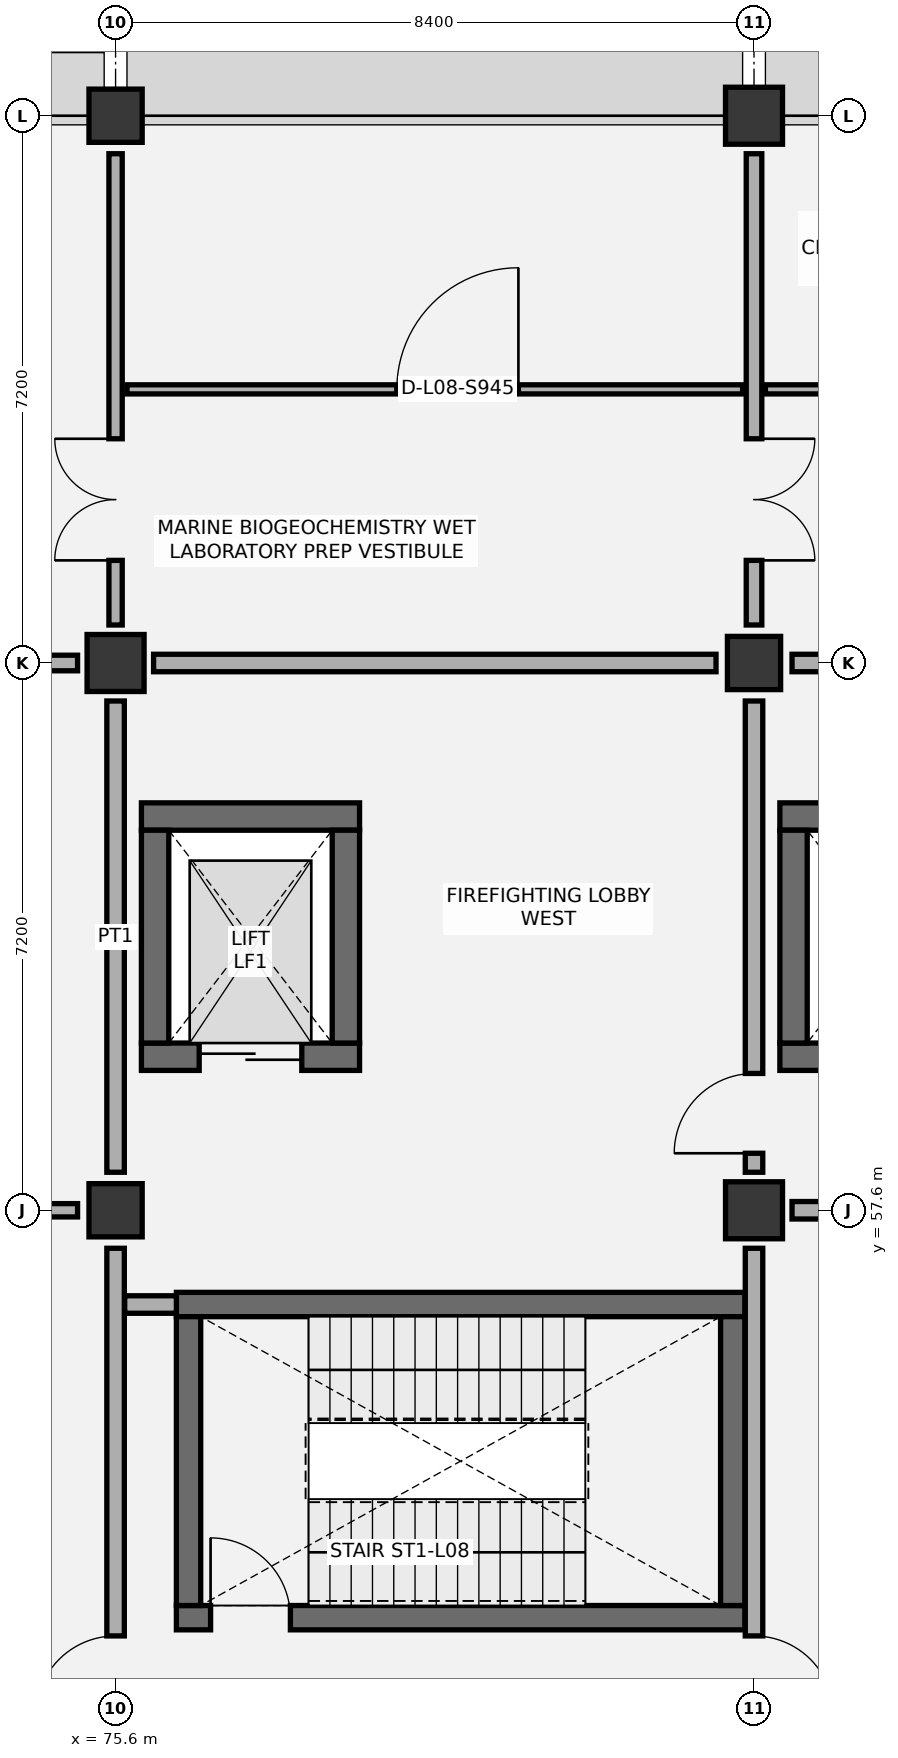
"""IFC4 building model, lengths in metres.
Left out: names, types, materials, properties, quantities, classifications, styles, units other than length and angle.
Written with IfcOpenShell. Run it as: python <this file> out.ifc"""

import sys

from ifc_helpers import new_model, si_unit, direction, frame, frame_2d, origin, origin_2d, place, context, subcontext, project, spatial, rectangle, extrude, element, fill, save


model = new_model("IFC4")
c1 = context("Model", 3, precision=1e-05, world=origin(), true_north=direction((0.0, 1.0)))
c2 = subcontext(c1, "Body", "Model", "MODEL_VIEW")
j1 = project(units=[si_unit("LENGTHUNIT", "METRE"), si_unit("PLANEANGLEUNIT", "RADIAN")], contexts=[c1])
p1 = place(None, origin())
s1 = spatial("IfcSite", under=j1, at=p1, CompositionType="ELEMENT")
p2 = place(p1, origin())
s2 = spatial("IfcBuilding", under=s1, at=p2, CompositionType="ELEMENT")
p3 = place(p2, frame((0.0, 0.0, 39.6)))
s3 = spatial("IfcBuildingStorey", under=s2, at=p3, CompositionType="ELEMENT", Elevation=39.6)
p4 = place(p3, frame((75.6, 57.6, 0.0), z_axis=(0.0, 0.0, 1.0), x_axis=(1.0, 0.0, 0.0)))
e1 = element("IfcColumn", 1, at=p4, inside=s3, PredefinedType="COLUMN", context=c2, shape_type="SweptSolid", body=[
    extrude(rectangle(XDim=0.7, YDim=0.7, at=origin_2d()), origin(), (0.0, 0.0, 1.0), 4.2),
])
p5 = place(p3, frame((75.6, 64.8, 0.0), z_axis=(0.0, 0.0, 1.0), x_axis=(1.0, 0.0, 0.0)))
e2 = element("IfcColumn", 2, at=p5, inside=s3, PredefinedType="COLUMN", context=c2, shape_type="SweptSolid", body=[
    extrude(rectangle(XDim=0.75, YDim=0.75, at=origin_2d()), origin(), (0.0, 0.0, 1.0), 4.2),
])
p6 = place(p3, frame((75.6, 72.0, 0.0), z_axis=(0.0, 0.0, 1.0), x_axis=(1.0, 0.0, 0.0)))
e3 = element("IfcColumn", 3, at=p6, inside=s3, PredefinedType="COLUMN", context=c2, shape_type="SweptSolid", body=[
    extrude(rectangle(XDim=0.7, YDim=0.7, at=origin_2d()), origin(), (0.0, 0.0, 1.0), 4.2),
])
p7 = place(p3, frame((84.0, 57.6, 0.0), z_axis=(0.0, 0.0, 1.0), x_axis=(1.0, 0.0, 0.0)))
e4 = element("IfcColumn", 4, at=p7, inside=s3, PredefinedType="COLUMN", context=c2, shape_type="SweptSolid", body=[
    extrude(rectangle(XDim=0.75, YDim=0.75, at=origin_2d()), origin(), (0.0, 0.0, 1.0), 4.2),
])
p8 = place(p3, frame((84.0, 64.8, 0.0), z_axis=(0.0, 0.0, 1.0), x_axis=(1.0, 0.0, 0.0)))
e5 = element("IfcColumn", 5, at=p8, inside=s3, PredefinedType="COLUMN", context=c2, shape_type="SweptSolid", body=[
    extrude(rectangle(XDim=0.7, YDim=0.7, at=origin_2d()), origin(), (0.0, 0.0, 1.0), 4.2),
])
p9 = place(p3, frame((84.0, 72.0, 0.0), z_axis=(0.0, 0.0, 1.0), x_axis=(1.0, 0.0, 0.0)))
e6 = element("IfcColumn", 6, at=p9, inside=s3, PredefinedType="COLUMN", context=c2, shape_type="SweptSolid", body=[
    extrude(rectangle(XDim=0.75, YDim=0.75, at=origin_2d()), origin(), (0.0, 0.0, 1.0), 4.2),
])
p10 = place(p3, frame((76.4, 52.24, 0.0), z_axis=(0.0, 0.0, 1.0), x_axis=(1.0, 0.0, 0.0)))
e7 = element("IfcWall", 7, at=p10, inside=s3, PredefinedType="SHEAR", context=c2, shape_type="SweptSolid", body=[
    extrude(rectangle(XDim=7.48, YDim=0.32, at=frame_2d((3.74, 0.0))), origin(), (0.0, 0.0, 1.0), 3.9),
])
p11 = place(p10, frame((0.45, 0.0, 0.0)))
e8 = element("IfcOpeningElement", 8, at=p11, cuts=e7, PredefinedType="OPENING", context=c2, shape_type="SweptSolid", body=[
    extrude(rectangle(XDim=1.05, YDim=2.15, at=frame_2d((0.525, 1.075))), frame((0.0, 0.17, 0.0), z_axis=(0.0, -1.0, 0.0), x_axis=(1.0, 0.0, 0.0)), (0.0, 0.0, 1.0), 0.34),
])
p12 = place(p3, frame((76.4, 56.36, 0.0), z_axis=(0.0, 0.0, 1.0), x_axis=(1.0, 0.0, 0.0)))
e9 = element("IfcWall", 9, at=p12, inside=s3, PredefinedType="SHEAR", context=c2, shape_type="SweptSolid", body=[
    extrude(rectangle(XDim=7.48, YDim=0.32, at=frame_2d((3.74, 0.0))), origin(), (0.0, 0.0, 1.0), 3.9),
])
for number, where, z_axis, x_axis in (
    (10, (76.56, 52.4, 0.0), (0.0, 0.0, 1.0), (0.0, 1.0, 0.0)),
    (11, (83.72, 52.4, 0.0), (0.0, 0.0, 1.0), (0.0, 1.0, 0.0)),
):
    element("IfcWall", number, at=place(p3, frame(where, z_axis=z_axis, x_axis=x_axis)), inside=s3, PredefinedType="SHEAR", context=c2, shape_type="SweptSolid", body=[
        extrude(rectangle(XDim=3.8, YDim=0.32, at=frame_2d((1.9, 0.0))), origin(), (0.0, 0.0, 1.0), 3.9),
    ])
p13 = place(p3, frame((75.94, 62.78, 0.0), z_axis=(0.0, 0.0, 1.0), x_axis=(1.0, 0.0, 0.0)))
e12 = element("IfcWall", 12, at=p13, inside=s3, PredefinedType="SHEAR", context=c2, shape_type="SweptSolid", body=[
    extrude(rectangle(XDim=2.87, YDim=0.36, at=frame_2d((1.435, 0.0))), origin(), (0.0, 0.0, 1.0), 3.9),
])
p14 = place(p3, frame((75.94, 59.62, 0.0), z_axis=(0.0, 0.0, 1.0), x_axis=(1.0, 0.0, 0.0)))
e13 = element("IfcWall", 13, at=p14, inside=s3, PredefinedType="SHEAR", context=c2, shape_type="SweptSolid", body=[
    extrude(rectangle(XDim=2.87, YDim=0.36, at=frame_2d((1.435, 0.0))), origin(), (0.0, 0.0, 1.0), 3.9),
])
p15 = place(p14, frame((0.76, 0.0, 0.0)))
e14 = element("IfcOpeningElement", 14, at=p15, cuts=e13, PredefinedType="OPENING", context=c2, shape_type="SweptSolid", body=[
    extrude(rectangle(XDim=1.35, YDim=2.2, at=frame_2d((0.675, 1.1))), frame((0.0, 0.19, 0.0), z_axis=(0.0, -1.0, 0.0), x_axis=(1.0, 0.0, 0.0)), (0.0, 0.0, 1.0), 0.38),
])
for number, where, z_axis, x_axis in (
    (15, (76.12, 59.8, 0.0), (0.0, 0.0, 1.0), (0.0, 1.0, 0.0)),
    (16, (78.63, 59.8, 0.0), (0.0, 0.0, 1.0), (0.0, 1.0, 0.0)),
):
    element("IfcWall", number, at=place(p3, frame(where, z_axis=z_axis, x_axis=x_axis)), inside=s3, PredefinedType="SHEAR", context=c2, shape_type="SweptSolid", body=[
        extrude(rectangle(XDim=2.8, YDim=0.36, at=frame_2d((1.4, 0.0))), origin(), (0.0, 0.0, 1.0), 3.9),
    ])
p16 = place(p3, frame((84.34, 62.78, 0.0), z_axis=(0.0, 0.0, 1.0), x_axis=(1.0, 0.0, 0.0)))
e17 = element("IfcWall", 17, at=p16, inside=s3, PredefinedType="SHEAR", context=c2, shape_type="SweptSolid", body=[
    extrude(rectangle(XDim=7.77, YDim=0.36, at=frame_2d((3.885, 0.0))), origin(), (0.0, 0.0, 1.0), 3.9),
])
p17 = place(p3, frame((84.34, 59.62, 0.0), z_axis=(0.0, 0.0, 1.0), x_axis=(1.0, 0.0, 0.0)))
e18 = element("IfcWall", 18, at=p17, inside=s3, PredefinedType="SHEAR", context=c2, shape_type="SweptSolid", body=[
    extrude(rectangle(XDim=2.66, YDim=0.36, at=frame_2d((1.33, 0.0))), origin(), (0.0, 0.0, 1.0), 3.9),
])
p18 = place(p17, frame((0.78, 0.0, 0.0)))
e19 = element("IfcOpeningElement", 19, at=p18, cuts=e18, PredefinedType="OPENING", context=c2, shape_type="SweptSolid", body=[
    extrude(rectangle(XDim=1.1, YDim=2.15, at=frame_2d((0.55, 1.075))), frame((0.0, 0.19, 0.0), z_axis=(0.0, -1.0, 0.0), x_axis=(1.0, 0.0, 0.0)), (0.0, 0.0, 1.0), 0.38),
])
p19 = place(p3, frame((84.52, 59.8, 0.0), z_axis=(0.0, 0.0, 1.0), x_axis=(0.0, 1.0, 0.0)))
e20 = element("IfcWall", 20, at=p19, inside=s3, PredefinedType="SHEAR", context=c2, shape_type="SweptSolid", body=[
    extrude(rectangle(XDim=2.8, YDim=0.36, at=frame_2d((1.4, 0.0))), origin(), (0.0, 0.0, 1.0), 3.9),
])
p20 = place(p3, frame((75.75, 68.4, 0.0), z_axis=(0.0, 0.0, 1.0), x_axis=(1.0, 0.0, 0.0)))
e21 = element("IfcWall", 21, at=p20, inside=s3, PredefinedType="PARTITIONING", context=c2, shape_type="SweptSolid", body=[
    extrude(rectangle(XDim=8.1, YDim=0.12, at=frame_2d((4.05, 0.0))), origin(), (0.0, 0.0, 1.0), 3.9),
])
p21 = place(p20, frame((3.55, 0.0, 0.0)))
e22 = element("IfcOpeningElement", 22, at=p21, cuts=e21, PredefinedType="OPENING", context=c2, shape_type="SweptSolid", body=[
    extrude(rectangle(XDim=1.6, YDim=2.2, at=frame_2d((0.8, 1.1))), frame((0.0, 0.07, 0.0), z_axis=(0.0, -1.0, 0.0), x_axis=(1.0, 0.0, 0.0)), (0.0, 0.0, 1.0), 0.14),
])
p22 = place(p3, frame((84.15, 68.4, 0.0), z_axis=(0.0, 0.0, 1.0), x_axis=(1.0, 0.0, 0.0)))
e23 = element("IfcWall", 23, at=p22, inside=s3, PredefinedType="PARTITIONING", context=c2, shape_type="SweptSolid", body=[
    extrude(rectangle(XDim=8.1, YDim=0.12, at=frame_2d((4.05, 0.0))), origin(), (0.0, 0.0, 1.0), 3.9),
])
p23 = place(p22, frame((3.55, 0.0, 0.0)))
e24 = element("IfcOpeningElement", 24, at=p23, cuts=e23, PredefinedType="OPENING", context=c2, shape_type="SweptSolid", body=[
    extrude(rectangle(XDim=1.6, YDim=2.2, at=frame_2d((0.8, 1.1))), frame((0.0, 0.07, 0.0), z_axis=(0.0, -1.0, 0.0), x_axis=(1.0, 0.0, 0.0)), (0.0, 0.0, 1.0), 0.14),
])
p24 = place(p3, frame((75.6, 50.9, 0.0), z_axis=(0.0, 0.0, 1.0), x_axis=(0.0, 1.0, 0.0)))
e25 = element("IfcWall", 25, at=p24, inside=s3, PredefinedType="PARTITIONING", context=c2, shape_type="SweptSolid", body=[
    extrude(rectangle(XDim=6.2, YDim=0.23, at=frame_2d((3.1, 0.0))), origin(), (0.0, 0.0, 1.0), 3.445),
])
p25 = place(p24, frame((0.05, 0.0, 0.0)))
e26 = element("IfcOpeningElement", 26, at=p25, cuts=e25, PredefinedType="OPENING", context=c2, shape_type="SweptSolid", body=[
    extrude(rectangle(XDim=1.05, YDim=2.15, at=frame_2d((0.525, 1.075))), frame((0.0, 0.125, 0.0), z_axis=(0.0, -1.0, 0.0), x_axis=(1.0, 0.0, 0.0)), (0.0, 0.0, 1.0), 0.25),
])
p26 = place(p3, frame((67.7, 57.6, 0.0), z_axis=(0.0, 0.0, 1.0), x_axis=(1.0, 0.0, 0.0)))
e27 = element("IfcWall", 27, at=p26, inside=s3, PredefinedType="PARTITIONING", context=c2, shape_type="SweptSolid", body=[
    extrude(rectangle(XDim=7.4, YDim=0.175, at=frame_2d((3.7, 0.0))), origin(), (0.0, 0.0, 1.0), 3.245),
])
p27 = place(p26, frame((2.975, 0.0, 0.0)))
e28 = element("IfcOpeningElement", 28, at=p27, cuts=e27, PredefinedType="OPENING", context=c2, shape_type="SweptSolid", body=[
    extrude(rectangle(XDim=1.45, YDim=2.2, at=frame_2d((0.725, 1.1))), frame((0.0, 0.097, 0.0), z_axis=(0.0, -1.0, 0.0), x_axis=(1.0, 0.0, 0.0)), (0.0, 0.0, 1.0), 0.195),
])
p28 = place(p3, frame((75.6, 58.1, 0.0), z_axis=(0.0, 0.0, 1.0), x_axis=(0.0, 1.0, 0.0)))
e29 = element("IfcWall", 29, at=p28, inside=s3, PredefinedType="PARTITIONING", context=c2, shape_type="SweptSolid", body=[
    extrude(rectangle(XDim=6.2, YDim=0.23, at=frame_2d((3.1, 0.0))), origin(), (0.0, 0.0, 1.0), 3.295),
])
p29 = place(p3, frame((67.7, 64.8, 0.0), z_axis=(0.0, 0.0, 1.0), x_axis=(1.0, 0.0, 0.0)))
e30 = element("IfcWall", 30, at=p29, inside=s3, PredefinedType="PARTITIONING", context=c2, shape_type="SweptSolid", body=[
    extrude(rectangle(XDim=7.4, YDim=0.205, at=frame_2d((3.7, 0.0))), origin(), (0.0, 0.0, 1.0), 3.245),
])
p30 = place(p29, frame((3.025, 0.0, 0.0)))
e31 = element("IfcOpeningElement", 31, at=p30, cuts=e30, PredefinedType="OPENING", context=c2, shape_type="SweptSolid", body=[
    extrude(rectangle(XDim=1.35, YDim=2.15, at=frame_2d((0.675, 1.075))), frame((0.0, 0.113, 0.0), z_axis=(0.0, -1.0, 0.0), x_axis=(1.0, 0.0, 0.0)), (0.0, 0.0, 1.0), 0.225),
])
p31 = place(p3, frame((75.6, 65.3, 0.0), z_axis=(0.0, 0.0, 1.0), x_axis=(0.0, 1.0, 0.0)))
e32 = element("IfcWall", 32, at=p31, inside=s3, PredefinedType="PARTITIONING", context=c2, shape_type="SweptSolid", body=[
    extrude(rectangle(XDim=6.2, YDim=0.175, at=frame_2d((3.1, 0.0))), origin(), (0.0, 0.0, 1.0), 3.555),
])
p32 = place(p31, frame((0.85, 0.0, 0.0)))
e33 = element("IfcOpeningElement", 33, at=p32, cuts=e32, PredefinedType="OPENING", context=c2, shape_type="SweptSolid", body=[
    extrude(rectangle(XDim=1.6, YDim=2.2, at=frame_2d((0.8, 1.1))), frame((0.0, 0.097, 0.0), z_axis=(0.0, -1.0, 0.0), x_axis=(1.0, 0.0, 0.0)), (0.0, 0.0, 1.0), 0.195),
])
p33 = place(p3, frame((84.0, 50.9, 0.0), z_axis=(0.0, 0.0, 1.0), x_axis=(0.0, 1.0, 0.0)))
e34 = element("IfcWall", 34, at=p33, inside=s3, PredefinedType="PARTITIONING", context=c2, shape_type="SweptSolid", body=[
    extrude(rectangle(XDim=6.2, YDim=0.23, at=frame_2d((3.1, 0.0))), origin(), (0.0, 0.0, 1.0), 3.345),
])
p34 = place(p33, frame((0.05, 0.0, 0.0)))
e35 = element("IfcOpeningElement", 35, at=p34, cuts=e34, PredefinedType="OPENING", context=c2, shape_type="SweptSolid", body=[
    extrude(rectangle(XDim=1.05, YDim=2.15, at=frame_2d((0.525, 1.075))), frame((0.0, 0.125, 0.0), z_axis=(0.0, -1.0, 0.0), x_axis=(1.0, 0.0, 0.0)), (0.0, 0.0, 1.0), 0.25),
])
p35 = place(p3, frame((75.72, 56.36, 0.0), z_axis=(0.0, 0.0, 1.0), x_axis=(1.0, 0.0, 0.0)))
e36 = element("IfcWall", 36, at=p35, inside=s3, PredefinedType="PARTITIONING", context=c2, shape_type="SweptSolid", body=[
    extrude(rectangle(XDim=0.68, YDim=0.23, at=frame_2d((0.34, 0.0))), origin(), (0.0, 0.0, 1.0), 3.9),
])
p36 = place(p3, frame((84.0, 58.1, 0.0), z_axis=(0.0, 0.0, 1.0), x_axis=(0.0, 1.0, 0.0)))
e37 = element("IfcWall", 37, at=p36, inside=s3, PredefinedType="PARTITIONING", context=c2, shape_type="SweptSolid", body=[
    extrude(rectangle(XDim=6.2, YDim=0.23, at=frame_2d((3.1, 0.0))), origin(), (0.0, 0.0, 1.0), 3.605),
])
p37 = place(p36, frame((0.25, 0.0, 0.0)))
e38 = element("IfcOpeningElement", 38, at=p37, cuts=e37, PredefinedType="OPENING", context=c2, shape_type="SweptSolid", body=[
    extrude(rectangle(XDim=1.05, YDim=2.15, at=frame_2d((0.525, 1.075))), frame((0.0, 0.125, 0.0), z_axis=(0.0, -1.0, 0.0), x_axis=(1.0, 0.0, 0.0)), (0.0, 0.0, 1.0), 0.25),
])
p38 = place(p3, frame((76.1, 64.8, 0.0), z_axis=(0.0, 0.0, 1.0), x_axis=(1.0, 0.0, 0.0)))
e39 = element("IfcWall", 39, at=p38, inside=s3, PredefinedType="PARTITIONING", context=c2, shape_type="SweptSolid", body=[
    extrude(rectangle(XDim=7.4, YDim=0.23, at=frame_2d((3.7, 0.0))), origin(), (0.0, 0.0, 1.0), 3.295),
])
p39 = place(p3, frame((84.0, 65.3, 0.0), z_axis=(0.0, 0.0, 1.0), x_axis=(0.0, 1.0, 0.0)))
e40 = element("IfcWall", 40, at=p39, inside=s3, PredefinedType="PARTITIONING", context=c2, shape_type="SweptSolid", body=[
    extrude(rectangle(XDim=6.2, YDim=0.205, at=frame_2d((3.1, 0.0))), origin(), (0.0, 0.0, 1.0), 3.345),
])
p40 = place(p39, frame((0.85, 0.0, 0.0)))
e41 = element("IfcOpeningElement", 41, at=p40, cuts=e40, PredefinedType="OPENING", context=c2, shape_type="SweptSolid", body=[
    extrude(rectangle(XDim=1.6, YDim=2.2, at=frame_2d((0.8, 1.1))), frame((0.0, 0.113, 0.0), z_axis=(0.0, -1.0, 0.0), x_axis=(1.0, 0.0, 0.0)), (0.0, 0.0, 1.0), 0.225),
])
p41 = place(p3, frame((84.5, 57.6, 0.0), z_axis=(0.0, 0.0, 1.0), x_axis=(1.0, 0.0, 0.0)))
e42 = element("IfcWall", 42, at=p41, inside=s3, PredefinedType="PARTITIONING", context=c2, shape_type="SweptSolid", body=[
    extrude(rectangle(XDim=7.4, YDim=0.23, at=frame_2d((3.7, 0.0))), origin(), (0.0, 0.0, 1.0), 3.295),
])
p42 = place(p41, frame((2.95, 0.0, 0.0)))
e43 = element("IfcOpeningElement", 43, at=p42, cuts=e42, PredefinedType="OPENING", context=c2, shape_type="SweptSolid", body=[
    extrude(rectangle(XDim=1.5, YDim=2.15, at=frame_2d((0.75, 1.075))), frame((0.0, 0.125, 0.0), z_axis=(0.0, -1.0, 0.0), x_axis=(1.0, 0.0, 0.0)), (0.0, 0.0, 1.0), 0.25),
])
p43 = place(p3, frame((84.5, 64.8, 0.0), z_axis=(0.0, 0.0, 1.0), x_axis=(1.0, 0.0, 0.0)))
e44 = element("IfcWall", 44, at=p43, inside=s3, PredefinedType="PARTITIONING", context=c2, shape_type="SweptSolid", body=[
    extrude(rectangle(XDim=7.4, YDim=0.23, at=frame_2d((3.7, 0.0))), origin(), (0.0, 0.0, 1.0), 3.295),
])
p44 = place(p11, origin())
e45 = element("IfcDoor", 45, at=p44, inside=s3, OperationType="SINGLE_SWING_LEFT", PredefinedType="DOOR", context=c2, shape_type="SweptSolid", body=[
    extrude(rectangle(XDim=1.05, YDim=2.15, at=frame_2d((0.525, 1.075))), frame((0.0, 0.025, 0.0), z_axis=(0.0, -1.0, 0.0), x_axis=(1.0, 0.0, 0.0)), (0.0, 0.0, 1.0), 0.05),
])
fill(e8, e45)
p45 = place(p15, origin())
e46 = element("IfcDoor", 46, at=p45, inside=s3, OperationType="DOUBLE_DOOR_SLIDING", PredefinedType="DOOR", context=c2, shape_type="SweptSolid", body=[
    extrude(rectangle(XDim=1.35, YDim=2.2, at=frame_2d((0.675, 1.1))), frame((0.0, 0.025, 0.0), z_axis=(0.0, -1.0, 0.0), x_axis=(1.0, 0.0, 0.0)), (0.0, 0.0, 1.0), 0.05),
])
fill(e14, e46)
p46 = place(p21, origin())
e47 = element("IfcDoor", 47, at=p46, inside=s3, OperationType="SINGLE_SWING_RIGHT", PredefinedType="DOOR", context=c2, shape_type="SweptSolid", body=[
    extrude(rectangle(XDim=1.6, YDim=2.2, at=frame_2d((0.8, 1.1))), frame((0.0, 0.025, 0.0), z_axis=(0.0, -1.0, 0.0), x_axis=(1.0, 0.0, 0.0)), (0.0, 0.0, 1.0), 0.05),
])
fill(e22, e47)
p47 = place(p25, origin())
e48 = element("IfcDoor", 48, at=p47, inside=s3, OperationType="SINGLE_SWING_LEFT", PredefinedType="DOOR", context=c2, shape_type="SweptSolid", body=[
    extrude(rectangle(XDim=1.05, YDim=2.15, at=frame_2d((0.525, 1.075))), frame((0.0, 0.025, 0.0), z_axis=(0.0, -1.0, 0.0), x_axis=(1.0, 0.0, 0.0)), (0.0, 0.0, 1.0), 0.05),
])
fill(e26, e48)
p48 = place(p32, origin())
e49 = element("IfcDoor", 49, at=p48, inside=s3, OperationType="DOUBLE_DOOR_SINGLE_SWING", PredefinedType="DOOR", context=c2, shape_type="SweptSolid", body=[
    extrude(rectangle(XDim=1.6, YDim=2.2, at=frame_2d((0.8, 1.1))), frame((0.0, 0.025, 0.0), z_axis=(0.0, -1.0, 0.0), x_axis=(1.0, 0.0, 0.0)), (0.0, 0.0, 1.0), 0.05),
])
fill(e33, e49)
p49 = place(p34, frame((1.05, 0.0, 0.0), z_axis=(0.0, 0.0, 1.0), x_axis=(-1.0, 0.0, 0.0)))
e50 = element("IfcDoor", 50, at=p49, inside=s3, OperationType="SINGLE_SWING_RIGHT", PredefinedType="DOOR", context=c2, shape_type="SweptSolid", body=[
    extrude(rectangle(XDim=1.05, YDim=2.15, at=frame_2d((0.525, 1.075))), frame((0.0, 0.025, 0.0), z_axis=(0.0, -1.0, 0.0), x_axis=(1.0, 0.0, 0.0)), (0.0, 0.0, 1.0), 0.05),
])
fill(e35, e50)
p50 = place(p37, origin())
e51 = element("IfcDoor", 51, at=p50, inside=s3, OperationType="SINGLE_SWING_LEFT", PredefinedType="DOOR", context=c2, shape_type="SweptSolid", body=[
    extrude(rectangle(XDim=1.05, YDim=2.15, at=frame_2d((0.525, 1.075))), frame((0.0, 0.025, 0.0), z_axis=(0.0, -1.0, 0.0), x_axis=(1.0, 0.0, 0.0)), (0.0, 0.0, 1.0), 0.05),
])
fill(e38, e51)
p51 = place(p40, frame((1.6, 0.0, 0.0), z_axis=(0.0, 0.0, 1.0), x_axis=(-1.0, 0.0, 0.0)))
e52 = element("IfcDoor", 52, at=p51, inside=s3, OperationType="DOUBLE_DOOR_SINGLE_SWING", PredefinedType="DOOR", context=c2, shape_type="SweptSolid", body=[
    extrude(rectangle(XDim=1.6, YDim=2.2, at=frame_2d((0.8, 1.1))), frame((0.0, 0.025, 0.0), z_axis=(0.0, -1.0, 0.0), x_axis=(1.0, 0.0, 0.0)), (0.0, 0.0, 1.0), 0.05),
])
fill(e41, e52)
save(model, sys.argv[1])
